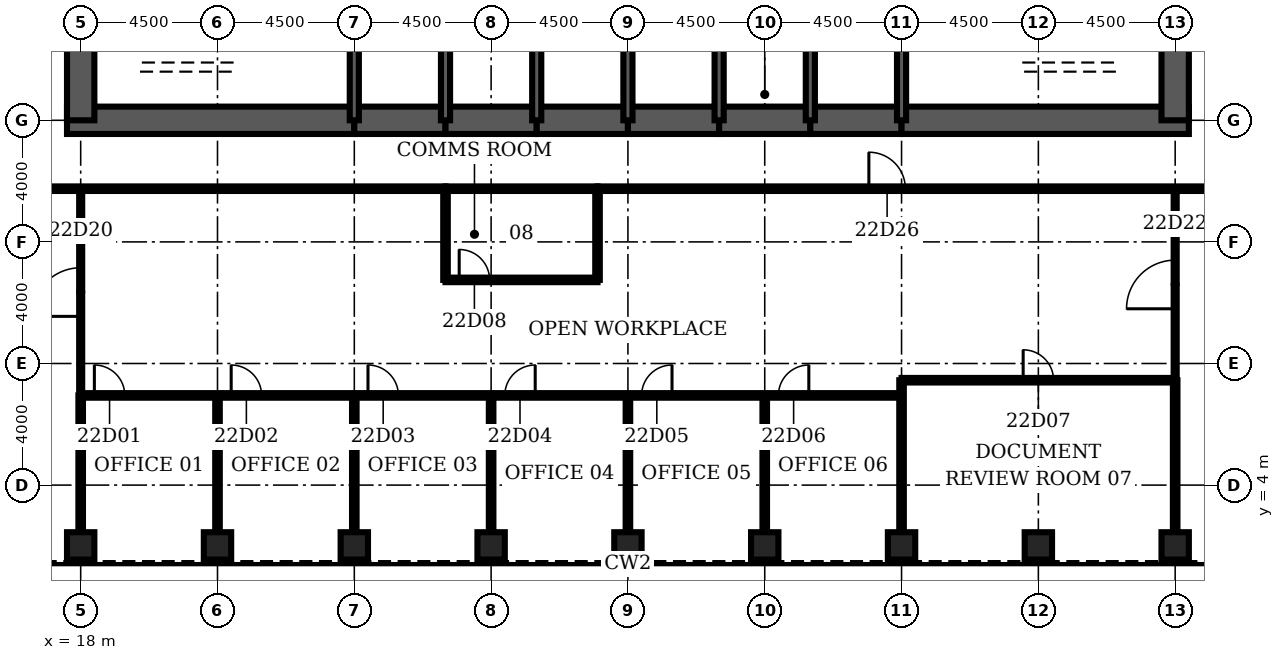
"""IFC4 building model, lengths in metres.
Left out: names, types, materials, properties, quantities, classifications, styles, units other than length and angle.
Written with IfcOpenShell. Run it as: python <this file> out.ifc"""

import sys

from ifc_helpers import new_model, si_unit, direction, frame, frame_2d, origin, origin_2d, place, context, subcontext, project, spatial, rectangle, hollow_rectangle, extrude, element, fill, save


model = new_model("IFC4")
c1 = context("Model", 3, precision=1e-05, world=origin(), true_north=direction((0.0, 1.0)))
c2 = subcontext(c1, "Body", "Model", "MODEL_VIEW")
j1 = project(units=[si_unit("LENGTHUNIT", "METRE"), si_unit("PLANEANGLEUNIT", "RADIAN")], contexts=[c1])
p1 = place(None, origin())
s1 = spatial("IfcSite", under=j1, at=p1, CompositionType="ELEMENT")
p2 = place(p1, origin())
s2 = spatial("IfcBuilding", under=s1, at=p2, CompositionType="ELEMENT")
p3 = place(p2, frame((0.0, 0.0, 104.7)))
s3 = spatial("IfcBuildingStorey", under=s2, at=p3, CompositionType="ELEMENT", Elevation=104.7)
for number, where, z_axis, x_axis in (
    (1, (18.0, 2.0, 0.0), (0.0, 0.0, 1.0), (0.0, 1.0, 0.0)),
    (2, (22.5, 2.0, 0.0), (0.0, 0.0, 1.0), (0.0, 1.0, 0.0)),
    (3, (27.0, 2.0, 0.0), (0.0, 0.0, 1.0), (0.0, 1.0, 0.0)),
    (4, (31.5, 2.0, 0.0), (0.0, 0.0, 1.0), (0.0, 1.0, 0.0)),
    (5, (36.0, 2.0, 0.0), (0.0, 0.0, 1.0), (0.0, 1.0, 0.0)),
    (6, (40.5, 2.0, 0.0), (0.0, 0.0, 1.0), (0.0, 1.0, 0.0)),
    (7, (45.0, 2.0, 0.0), (0.0, 0.0, 1.0), (0.0, 1.0, 0.0)),
    (8, (49.5, 2.0, 0.0), (0.0, 0.0, 1.0), (0.0, 1.0, 0.0)),
    (9, (54.0, 2.0, 0.0), (0.0, 0.0, 1.0), (0.0, 1.0, 0.0)),
):
    element("IfcColumn", number, at=place(p3, frame(where, z_axis=z_axis, x_axis=x_axis)), inside=s3, PredefinedType="COLUMN", context=c2, shape_type="SweptSolid", body=[
        extrude(hollow_rectangle(XDim=0.9, YDim=0.9, WallThickness=0.11, at=origin_2d()), origin(), (0.0, 0.0, 1.0), 4.2),
    ])
p4 = place(p3, frame((17.55, 16.0, 0.0), z_axis=(0.0, 0.0, 1.0), x_axis=(1.0, 0.0, 0.0)))
e10 = element("IfcWall", 10, at=p4, inside=s3, PredefinedType="SHEAR", context=c2, shape_type="SweptSolid", body=[
    extrude(rectangle(XDim=9.45, YDim=0.9, at=frame_2d((4.725, 0.0))), origin(), (0.0, 0.0, 1.0), 4.2),
])
for number, where, z_axis, x_axis in (
    (11, (27.0, 16.0, 0.0), (0.0, 0.0, 1.0), (1.0, 0.0, 0.0)),
    (12, (30.0, 16.0, 0.0), (0.0, 0.0, 1.0), (1.0, 0.0, 0.0)),
    (13, (33.0, 16.0, 0.0), (0.0, 0.0, 1.0), (1.0, 0.0, 0.0)),
    (14, (36.0, 16.0, 0.0), (0.0, 0.0, 1.0), (1.0, 0.0, 0.0)),
    (15, (39.0, 16.0, 0.0), (0.0, 0.0, 1.0), (1.0, 0.0, 0.0)),
    (16, (42.0, 16.0, 0.0), (0.0, 0.0, 1.0), (1.0, 0.0, 0.0)),
):
    element("IfcWall", number, at=place(p3, frame(where, z_axis=z_axis, x_axis=x_axis)), inside=s3, PredefinedType="SHEAR", context=c2, shape_type="SweptSolid", body=[
        extrude(rectangle(XDim=3.0, YDim=0.9, at=frame_2d((1.5, 0.0))), origin(), (0.0, 0.0, 1.0), 4.2),
    ])
p5 = place(p3, frame((45.0, 16.0, 0.0), z_axis=(0.0, 0.0, 1.0), x_axis=(1.0, 0.0, 0.0)))
e17 = element("IfcWall", 17, at=p5, inside=s3, PredefinedType="SHEAR", context=c2, shape_type="SweptSolid", body=[
    extrude(rectangle(XDim=9.45, YDim=0.9, at=frame_2d((4.725, 0.0))), origin(), (0.0, 0.0, 1.0), 4.2),
])
for number, where, z_axis, x_axis in (
    (18, (18.0, 19.2, 0.0), (0.0, 0.0, 1.0), (0.0, -1.0, 0.0)),
    (19, (54.0, 16.0, 0.0), (0.0, 0.0, 1.0), (0.0, 1.0, 0.0)),
):
    element("IfcWall", number, at=place(p3, frame(where, z_axis=z_axis, x_axis=x_axis)), inside=s3, PredefinedType="SHEAR", context=c2, shape_type="SweptSolid", body=[
        extrude(rectangle(XDim=3.2, YDim=0.9, at=frame_2d((1.6, 0.0))), origin(), (0.0, 0.0, 1.0), 4.2),
    ])
for number, where, z_axis, x_axis in (
    (20, (27.0, 16.0, 0.0), (0.0, 0.0, 1.0), (0.0, 1.0, 0.0)),
    (21, (30.0, 16.0, 0.0), (0.0, 0.0, 1.0), (0.0, 1.0, 0.0)),
    (22, (33.0, 16.0, 0.0), (0.0, 0.0, 1.0), (0.0, 1.0, 0.0)),
    (23, (36.0, 16.0, 0.0), (0.0, 0.0, 1.0), (0.0, 1.0, 0.0)),
    (24, (39.0, 16.0, 0.0), (0.0, 0.0, 1.0), (0.0, 1.0, 0.0)),
    (25, (42.0, 16.0, 0.0), (0.0, 0.0, 1.0), (0.0, 1.0, 0.0)),
    (26, (45.0, 16.0, 0.0), (0.0, 0.0, 1.0), (0.0, 1.0, 0.0)),
):
    element("IfcWall", number, at=place(p3, frame(where, z_axis=z_axis, x_axis=x_axis)), inside=s3, PredefinedType="SOLIDWALL", context=c2, shape_type="SweptSolid", body=[
        extrude(rectangle(XDim=3.2, YDim=0.3, at=frame_2d((1.6, 0.0))), origin(), (0.0, 0.0, 1.0), 4.2),
    ])
p6 = place(p3, frame((39.15, 17.4, 0.0), z_axis=(0.0, 0.0, 1.0), x_axis=(1.0, 0.0, 0.0)))
e27 = element("IfcWall", 27, at=p6, inside=s3, PredefinedType="SOLIDWALL", context=c2, shape_type="SweptSolid", body=[
    extrude(rectangle(XDim=2.7, YDim=0.3, at=frame_2d((1.35, 0.0))), origin(), (0.0, 0.0, 1.0), 4.04),
])
p7 = place(p6, frame((0.85, 0.0, 0.0)))
e28 = element("IfcOpeningElement", 28, at=p7, cuts=e27, PredefinedType="OPENING", context=c2, shape_type="SweptSolid", body=[
    extrude(rectangle(XDim=1.0, YDim=2.1, at=frame_2d((0.5, 1.05))), frame((0.0, 0.16, 0.0), z_axis=(0.0, -1.0, 0.0), x_axis=(1.0, 0.0, 0.0)), (0.0, 0.0, 1.0), 0.32),
])
p8 = place(p3, frame((18.0, 6.95, 0.0), z_axis=(0.0, 0.0, 1.0), x_axis=(1.0, 0.0, 0.0)))
e29 = element("IfcWall", 29, at=p8, inside=s3, PredefinedType="PARTITIONING", context=c2, shape_type="SweptSolid", body=[
    extrude(rectangle(XDim=27.0, YDim=0.15, at=frame_2d((13.5, 0.0))), origin(), (0.0, 0.0, 1.0), 3.0),
])
p9 = place(p8, frame((0.45, 0.0, 0.0)))
e30 = element("IfcOpeningElement", 30, at=p9, cuts=e29, PredefinedType="OPENING", context=c2, shape_type="SweptSolid", body=[
    extrude(rectangle(XDim=1.0, YDim=2.1, at=frame_2d((0.5, 1.05))), frame((0.0, 0.085, 0.0), z_axis=(0.0, -1.0, 0.0), x_axis=(1.0, 0.0, 0.0)), (0.0, 0.0, 1.0), 0.17),
])
p10 = place(p8, frame((4.95, 0.0, 0.0)))
e31 = element("IfcOpeningElement", 31, at=p10, cuts=e29, PredefinedType="OPENING", context=c2, shape_type="SweptSolid", body=[
    extrude(rectangle(XDim=1.0, YDim=2.1, at=frame_2d((0.5, 1.05))), frame((0.0, 0.085, 0.0), z_axis=(0.0, -1.0, 0.0), x_axis=(1.0, 0.0, 0.0)), (0.0, 0.0, 1.0), 0.17),
])
p11 = place(p8, frame((9.45, 0.0, 0.0)))
e32 = element("IfcOpeningElement", 32, at=p11, cuts=e29, PredefinedType="OPENING", context=c2, shape_type="SweptSolid", body=[
    extrude(rectangle(XDim=1.0, YDim=2.1, at=frame_2d((0.5, 1.05))), frame((0.0, 0.085, 0.0), z_axis=(0.0, -1.0, 0.0), x_axis=(1.0, 0.0, 0.0)), (0.0, 0.0, 1.0), 0.17),
])
p12 = place(p8, frame((13.95, 0.0, 0.0)))
e33 = element("IfcOpeningElement", 33, at=p12, cuts=e29, PredefinedType="OPENING", context=c2, shape_type="SweptSolid", body=[
    extrude(rectangle(XDim=1.0, YDim=2.1, at=frame_2d((0.5, 1.05))), frame((0.0, 0.085, 0.0), z_axis=(0.0, -1.0, 0.0), x_axis=(1.0, 0.0, 0.0)), (0.0, 0.0, 1.0), 0.17),
])
p13 = place(p8, frame((18.45, 0.0, 0.0)))
e34 = element("IfcOpeningElement", 34, at=p13, cuts=e29, PredefinedType="OPENING", context=c2, shape_type="SweptSolid", body=[
    extrude(rectangle(XDim=1.0, YDim=2.1, at=frame_2d((0.5, 1.05))), frame((0.0, 0.085, 0.0), z_axis=(0.0, -1.0, 0.0), x_axis=(1.0, 0.0, 0.0)), (0.0, 0.0, 1.0), 0.17),
])
p14 = place(p8, frame((22.95, 0.0, 0.0)))
e35 = element("IfcOpeningElement", 35, at=p14, cuts=e29, PredefinedType="OPENING", context=c2, shape_type="SweptSolid", body=[
    extrude(rectangle(XDim=1.0, YDim=2.1, at=frame_2d((0.5, 1.05))), frame((0.0, 0.085, 0.0), z_axis=(0.0, -1.0, 0.0), x_axis=(1.0, 0.0, 0.0)), (0.0, 0.0, 1.0), 0.17),
])
p15 = place(p3, frame((45.0, 7.45, 0.0), z_axis=(0.0, 0.0, 1.0), x_axis=(1.0, 0.0, 0.0)))
e36 = element("IfcWall", 36, at=p15, inside=s3, PredefinedType="PARTITIONING", context=c2, shape_type="SweptSolid", body=[
    extrude(rectangle(XDim=9.0, YDim=0.15, at=frame_2d((4.5, 0.0))), origin(), (0.0, 0.0, 1.0), 3.0),
])
p16 = place(p15, frame((4.0, 0.0, 0.0)))
e37 = element("IfcOpeningElement", 37, at=p16, cuts=e36, PredefinedType="OPENING", context=c2, shape_type="SweptSolid", body=[
    extrude(rectangle(XDim=1.0, YDim=2.1, at=frame_2d((0.5, 1.05))), frame((0.0, 0.085, 0.0), z_axis=(0.0, -1.0, 0.0), x_axis=(1.0, 0.0, 0.0)), (0.0, 0.0, 1.0), 0.17),
])
p17 = place(p3, frame((30.0, 10.75, 0.0), z_axis=(0.0, 0.0, 1.0), x_axis=(1.0, 0.0, 0.0)))
e38 = element("IfcWall", 38, at=p17, inside=s3, PredefinedType="PARTITIONING", context=c2, shape_type="SweptSolid", body=[
    extrude(rectangle(XDim=5.0, YDim=0.15, at=frame_2d((2.5, 0.0))), origin(), (0.0, 0.0, 1.0), 3.0),
])
p18 = place(p17, frame((0.45, 0.0, 0.0)))
e39 = element("IfcOpeningElement", 39, at=p18, cuts=e38, PredefinedType="OPENING", context=c2, shape_type="SweptSolid", body=[
    extrude(rectangle(XDim=1.0, YDim=2.1, at=frame_2d((0.5, 1.05))), frame((0.0, 0.085, 0.0), z_axis=(0.0, -1.0, 0.0), x_axis=(1.0, 0.0, 0.0)), (0.0, 0.0, 1.0), 0.17),
])
p19 = place(p3, frame((15.15, 13.75, 0.0), z_axis=(0.0, 0.0, 1.0), x_axis=(1.0, 0.0, 0.0)))
e40 = element("IfcWall", 40, at=p19, inside=s3, PredefinedType="PARTITIONING", context=c2, shape_type="SweptSolid", body=[
    extrude(rectangle(XDim=14.85, YDim=0.15, at=frame_2d((7.425, 0.0))), origin(), (0.0, 0.0, 1.0), 3.0),
])
p20 = place(p3, frame((30.0, 13.75, 0.0), z_axis=(0.0, 0.0, 1.0), x_axis=(1.0, 0.0, 0.0)))
e41 = element("IfcWall", 41, at=p20, inside=s3, PredefinedType="PARTITIONING", context=c2, shape_type="SweptSolid", body=[
    extrude(rectangle(XDim=5.0, YDim=0.15, at=frame_2d((2.5, 0.0))), origin(), (0.0, 0.0, 1.0), 3.0),
])
p21 = place(p3, frame((35.0, 13.75, 0.0), z_axis=(0.0, 0.0, 1.0), x_axis=(1.0, 0.0, 0.0)))
e42 = element("IfcWall", 42, at=p21, inside=s3, PredefinedType="PARTITIONING", context=c2, shape_type="SweptSolid", body=[
    extrude(rectangle(XDim=21.85, YDim=0.15, at=frame_2d((10.925, 0.0))), origin(), (0.0, 0.0, 1.0), 3.0),
])
p22 = place(p21, frame((8.925, 0.0, 0.0)))
e43 = element("IfcOpeningElement", 43, at=p22, cuts=e42, PredefinedType="OPENING", context=c2, shape_type="SweptSolid", body=[
    extrude(rectangle(XDim=1.2, YDim=2.1, at=frame_2d((0.6, 1.05))), frame((0.0, 0.085, 0.0), z_axis=(0.0, -1.0, 0.0), x_axis=(1.0, 0.0, 0.0)), (0.0, 0.0, 1.0), 0.17),
])
p23 = place(p3, frame((18.0, 2.45, 0.0), z_axis=(0.0, 0.0, 1.0), x_axis=(0.0, 1.0, 0.0)))
e44 = element("IfcWall", 44, at=p23, inside=s3, PredefinedType="PARTITIONING", context=c2, shape_type="SweptSolid", body=[
    extrude(rectangle(XDim=4.5, YDim=0.15, at=frame_2d((2.25, 0.0))), origin(), (0.0, 0.0, 1.0), 3.0),
])
p24 = place(p3, frame((18.0, 6.95, 0.0), z_axis=(0.0, 0.0, 1.0), x_axis=(0.0, 1.0, 0.0)))
e45 = element("IfcWall", 45, at=p24, inside=s3, PredefinedType="PARTITIONING", context=c2, shape_type="SweptSolid", body=[
    extrude(rectangle(XDim=6.8, YDim=0.1, at=frame_2d((3.4, 0.0))), origin(), (0.0, 0.0, 1.0), 3.0),
])
p25 = place(p24, frame((2.6, 0.0, 0.0)))
e46 = element("IfcOpeningElement", 46, at=p25, cuts=e45, PredefinedType="OPENING", context=c2, shape_type="SweptSolid", body=[
    extrude(rectangle(XDim=1.6, YDim=2.1, at=frame_2d((0.8, 1.05))), frame((0.0, 0.06, 0.0), z_axis=(0.0, -1.0, 0.0), x_axis=(1.0, 0.0, 0.0)), (0.0, 0.0, 1.0), 0.12),
])
for number, where, z_axis, x_axis in (
    (47, (22.5, 2.45, 0.0), (0.0, 0.0, 1.0), (0.0, 1.0, 0.0)),
    (48, (27.0, 2.45, 0.0), (0.0, 0.0, 1.0), (0.0, 1.0, 0.0)),
):
    element("IfcWall", number, at=place(p3, frame(where, z_axis=z_axis, x_axis=x_axis)), inside=s3, PredefinedType="PARTITIONING", context=c2, shape_type="SweptSolid", body=[
        extrude(rectangle(XDim=4.5, YDim=0.15, at=frame_2d((2.25, 0.0))), origin(), (0.0, 0.0, 1.0), 3.0),
    ])
p26 = place(p3, frame((30.0, 10.75, 0.0), z_axis=(0.0, 0.0, 1.0), x_axis=(0.0, 1.0, 0.0)))
e49 = element("IfcWall", 49, at=p26, inside=s3, PredefinedType="PARTITIONING", context=c2, shape_type="SweptSolid", body=[
    extrude(rectangle(XDim=3.0, YDim=0.15, at=frame_2d((1.5, 0.0))), origin(), (0.0, 0.0, 1.0), 3.0),
])
p27 = place(p3, frame((31.5, 2.45, 0.0), z_axis=(0.0, 0.0, 1.0), x_axis=(0.0, 1.0, 0.0)))
e50 = element("IfcWall", 50, at=p27, inside=s3, PredefinedType="PARTITIONING", context=c2, shape_type="SweptSolid", body=[
    extrude(rectangle(XDim=4.5, YDim=0.15, at=frame_2d((2.25, 0.0))), origin(), (0.0, 0.0, 1.0), 3.0),
])
p28 = place(p3, frame((35.0, 10.75, 0.0), z_axis=(0.0, 0.0, 1.0), x_axis=(0.0, 1.0, 0.0)))
e51 = element("IfcWall", 51, at=p28, inside=s3, PredefinedType="PARTITIONING", context=c2, shape_type="SweptSolid", body=[
    extrude(rectangle(XDim=3.0, YDim=0.15, at=frame_2d((1.5, 0.0))), origin(), (0.0, 0.0, 1.0), 3.0),
])
for number, where, z_axis, x_axis in (
    (52, (36.0, 2.45, 0.0), (0.0, 0.0, 1.0), (0.0, 1.0, 0.0)),
    (53, (40.5, 2.45, 0.0), (0.0, 0.0, 1.0), (0.0, 1.0, 0.0)),
):
    element("IfcWall", number, at=place(p3, frame(where, z_axis=z_axis, x_axis=x_axis)), inside=s3, PredefinedType="PARTITIONING", context=c2, shape_type="SweptSolid", body=[
        extrude(rectangle(XDim=4.5, YDim=0.15, at=frame_2d((2.25, 0.0))), origin(), (0.0, 0.0, 1.0), 3.0),
    ])
for number, where, z_axis, x_axis in (
    (54, (45.0, 2.45, 0.0), (0.0, 0.0, 1.0), (0.0, 1.0, 0.0)),
    (55, (54.0, 2.45, 0.0), (0.0, 0.0, 1.0), (0.0, 1.0, 0.0)),
):
    element("IfcWall", number, at=place(p3, frame(where, z_axis=z_axis, x_axis=x_axis)), inside=s3, PredefinedType="PARTITIONING", context=c2, shape_type="SweptSolid", body=[
        extrude(rectangle(XDim=5.0, YDim=0.15, at=frame_2d((2.5, 0.0))), origin(), (0.0, 0.0, 1.0), 3.0),
    ])
p29 = place(p3, frame((54.0, 7.45, 0.0), z_axis=(0.0, 0.0, 1.0), x_axis=(0.0, 1.0, 0.0)))
e56 = element("IfcWall", 56, at=p29, inside=s3, PredefinedType="PARTITIONING", context=c2, shape_type="SweptSolid", body=[
    extrude(rectangle(XDim=6.3, YDim=0.1, at=frame_2d((3.15, 0.0))), origin(), (0.0, 0.0, 1.0), 3.0),
])
p30 = place(p29, frame((2.35, 0.0, 0.0)))
e57 = element("IfcOpeningElement", 57, at=p30, cuts=e56, PredefinedType="OPENING", context=c2, shape_type="SweptSolid", body=[
    extrude(rectangle(XDim=1.6, YDim=2.1, at=frame_2d((0.8, 1.05))), frame((0.0, 0.06, 0.0), z_axis=(0.0, -1.0, 0.0), x_axis=(1.0, 0.0, 0.0)), (0.0, 0.0, 1.0), 0.12),
])
p31 = place(p7, origin())
e58 = element("IfcDoor", 58, at=p31, inside=s3, OperationType="SINGLE_SWING_LEFT", PredefinedType="DOOR", context=c2, shape_type="SweptSolid", body=[
    extrude(rectangle(XDim=1.0, YDim=2.1, at=frame_2d((0.5, 1.05))), frame((0.0, 0.025, 0.0), z_axis=(0.0, -1.0, 0.0), x_axis=(1.0, 0.0, 0.0)), (0.0, 0.0, 1.0), 0.05),
])
fill(e28, e58)
p32 = place(p9, origin())
e59 = element("IfcDoor", 59, at=p32, inside=s3, OperationType="SINGLE_SWING_LEFT", PredefinedType="DOOR", context=c2, shape_type="SweptSolid", body=[
    extrude(rectangle(XDim=1.0, YDim=2.1, at=frame_2d((0.5, 1.05))), frame((0.0, 0.025, 0.0), z_axis=(0.0, -1.0, 0.0), x_axis=(1.0, 0.0, 0.0)), (0.0, 0.0, 1.0), 0.05),
])
fill(e30, e59)
p33 = place(p10, origin())
e60 = element("IfcDoor", 60, at=p33, inside=s3, OperationType="SINGLE_SWING_LEFT", PredefinedType="DOOR", context=c2, shape_type="SweptSolid", body=[
    extrude(rectangle(XDim=1.0, YDim=2.1, at=frame_2d((0.5, 1.05))), frame((0.0, 0.025, 0.0), z_axis=(0.0, -1.0, 0.0), x_axis=(1.0, 0.0, 0.0)), (0.0, 0.0, 1.0), 0.05),
])
fill(e31, e60)
p34 = place(p11, origin())
e61 = element("IfcDoor", 61, at=p34, inside=s3, OperationType="SINGLE_SWING_LEFT", PredefinedType="DOOR", context=c2, shape_type="SweptSolid", body=[
    extrude(rectangle(XDim=1.0, YDim=2.1, at=frame_2d((0.5, 1.05))), frame((0.0, 0.025, 0.0), z_axis=(0.0, -1.0, 0.0), x_axis=(1.0, 0.0, 0.0)), (0.0, 0.0, 1.0), 0.05),
])
fill(e32, e61)
p35 = place(p12, origin())
e62 = element("IfcDoor", 62, at=p35, inside=s3, OperationType="SINGLE_SWING_RIGHT", PredefinedType="DOOR", context=c2, shape_type="SweptSolid", body=[
    extrude(rectangle(XDim=1.0, YDim=2.1, at=frame_2d((0.5, 1.05))), frame((0.0, 0.025, 0.0), z_axis=(0.0, -1.0, 0.0), x_axis=(1.0, 0.0, 0.0)), (0.0, 0.0, 1.0), 0.05),
])
fill(e33, e62)
p36 = place(p13, origin())
e63 = element("IfcDoor", 63, at=p36, inside=s3, OperationType="SINGLE_SWING_RIGHT", PredefinedType="DOOR", context=c2, shape_type="SweptSolid", body=[
    extrude(rectangle(XDim=1.0, YDim=2.1, at=frame_2d((0.5, 1.05))), frame((0.0, 0.025, 0.0), z_axis=(0.0, -1.0, 0.0), x_axis=(1.0, 0.0, 0.0)), (0.0, 0.0, 1.0), 0.05),
])
fill(e34, e63)
p37 = place(p14, origin())
e64 = element("IfcDoor", 64, at=p37, inside=s3, OperationType="SINGLE_SWING_RIGHT", PredefinedType="DOOR", context=c2, shape_type="SweptSolid", body=[
    extrude(rectangle(XDim=1.0, YDim=2.1, at=frame_2d((0.5, 1.05))), frame((0.0, 0.025, 0.0), z_axis=(0.0, -1.0, 0.0), x_axis=(1.0, 0.0, 0.0)), (0.0, 0.0, 1.0), 0.05),
])
fill(e35, e64)
p38 = place(p16, origin())
e65 = element("IfcDoor", 65, at=p38, inside=s3, OperationType="SINGLE_SWING_LEFT", PredefinedType="DOOR", context=c2, shape_type="SweptSolid", body=[
    extrude(rectangle(XDim=1.0, YDim=2.1, at=frame_2d((0.5, 1.05))), frame((0.0, 0.025, 0.0), z_axis=(0.0, -1.0, 0.0), x_axis=(1.0, 0.0, 0.0)), (0.0, 0.0, 1.0), 0.05),
])
fill(e37, e65)
p39 = place(p18, origin())
e66 = element("IfcDoor", 66, at=p39, inside=s3, OperationType="SINGLE_SWING_LEFT", PredefinedType="DOOR", context=c2, shape_type="SweptSolid", body=[
    extrude(rectangle(XDim=1.0, YDim=2.1, at=frame_2d((0.5, 1.05))), frame((0.0, 0.025, 0.0), z_axis=(0.0, -1.0, 0.0), x_axis=(1.0, 0.0, 0.0)), (0.0, 0.0, 1.0), 0.05),
])
fill(e39, e66)
p40 = place(p25, origin())
e67 = element("IfcDoor", 67, at=p40, inside=s3, OperationType="SINGLE_SWING_LEFT", PredefinedType="DOOR", context=c2, shape_type="SweptSolid", body=[
    extrude(rectangle(XDim=1.6, YDim=2.1, at=frame_2d((0.8, 1.05))), frame((0.0, 0.025, 0.0), z_axis=(0.0, -1.0, 0.0), x_axis=(1.0, 0.0, 0.0)), (0.0, 0.0, 1.0), 0.05),
])
fill(e46, e67)
p41 = place(p30, origin())
e68 = element("IfcDoor", 68, at=p41, inside=s3, OperationType="SINGLE_SWING_LEFT", PredefinedType="DOOR", context=c2, shape_type="SweptSolid", body=[
    extrude(rectangle(XDim=1.6, YDim=2.1, at=frame_2d((0.8, 1.05))), frame((0.0, 0.025, 0.0), z_axis=(0.0, -1.0, 0.0), x_axis=(1.0, 0.0, 0.0)), (0.0, 0.0, 1.0), 0.05),
])
fill(e57, e68)
p42 = place(p22, origin())
e69 = element("IfcDoor", 69, at=p42, inside=s3, OperationType="SINGLE_SWING_LEFT", PredefinedType="DOOR", context=c2, shape_type="SweptSolid", body=[
    extrude(rectangle(XDim=1.2, YDim=2.1, at=frame_2d((0.6, 1.05))), frame((0.0, 0.025, 0.0), z_axis=(0.0, -1.0, 0.0), x_axis=(1.0, 0.0, 0.0)), (0.0, 0.0, 1.0), 0.05),
])
fill(e43, e69)
save(model, sys.argv[1])
